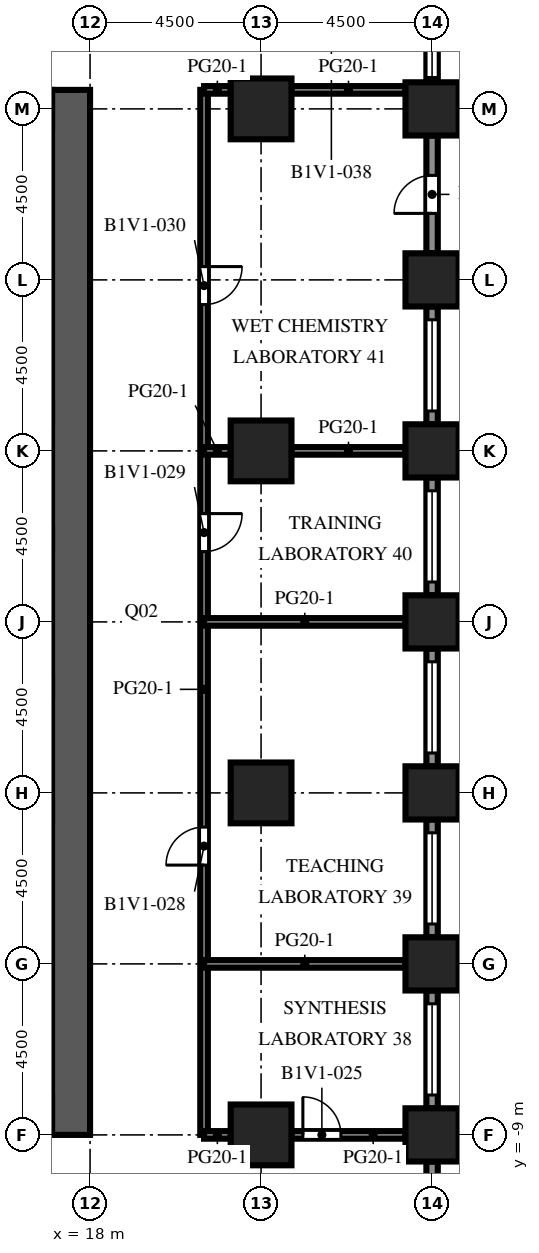
"""IFC4 building model, lengths in metres.
Left out: names, types, materials, properties, quantities, classifications, styles, units other than length and angle.
Written with IfcOpenShell. Run it as: python <this file> out.ifc"""

import sys

from ifc_helpers import new_model, si_unit, direction, frame, frame_2d, origin, origin_2d, place, context, subcontext, project, spatial, rectangle, extrude, element, fill, save


model = new_model("IFC4")
c1 = context("Model", 3, precision=1e-05, world=origin(), true_north=direction((0.0, 1.0)))
c2 = subcontext(c1, "Body", "Model", "MODEL_VIEW")
j1 = project(units=[si_unit("LENGTHUNIT", "METRE"), si_unit("PLANEANGLEUNIT", "RADIAN")], contexts=[c1])
p1 = place(None, origin())
s1 = spatial("IfcSite", under=j1, at=p1, CompositionType="ELEMENT")
p2 = place(p1, origin())
s2 = spatial("IfcBuilding", under=s1, at=p2, CompositionType="ELEMENT")
p3 = place(p2, frame((0.0, 0.0, 23.6)))
s3 = spatial("IfcBuildingStorey", under=s2, at=p3, CompositionType="ELEMENT", Elevation=23.6)
for number, where, z_axis, x_axis in (
    (1, (27.0, -9.0, 0.0), (0.0, 0.0, 1.0), (1.0, 0.0, 0.0)),
    (2, (27.0, -4.5, 0.0), (0.0, 0.0, 1.0), (1.0, 0.0, 0.0)),
    (3, (27.0, 0.0, 0.0), (0.0, 0.0, 1.0), (1.0, 0.0, 0.0)),
    (4, (27.0, 4.5, 0.0), (0.0, 0.0, 1.0), (1.0, 0.0, 0.0)),
    (5, (27.0, 9.0, 0.0), (0.0, 0.0, 1.0), (1.0, 0.0, 0.0)),
    (6, (27.0, 13.5, 0.0), (0.0, 0.0, 1.0), (1.0, 0.0, 0.0)),
    (7, (27.0, 18.0, 0.0), (0.0, 0.0, 1.0), (1.0, 0.0, 0.0)),
):
    element("IfcColumn", number, at=place(p3, frame(where, z_axis=z_axis, x_axis=x_axis)), inside=s3, PredefinedType="COLUMN", context=c2, shape_type="SweptSolid", body=[
        extrude(rectangle(XDim=1.4, YDim=1.4, at=origin_2d()), origin(), (0.0, 0.0, 1.0), 4.1),
    ])
for number, where, z_axis, x_axis in (
    (8, (22.5, -9.0, 0.0), (0.0, 0.0, 1.0), (1.0, 0.0, 0.0)),
    (9, (22.5, 0.0, 0.0), (0.0, 0.0, 1.0), (1.0, 0.0, 0.0)),
    (10, (22.5, 9.0, 0.0), (0.0, 0.0, 1.0), (1.0, 0.0, 0.0)),
    (11, (22.5, 18.0, 0.0), (0.0, 0.0, 1.0), (1.0, 0.0, 0.0)),
):
    element("IfcColumn", number, at=place(p3, frame(where, z_axis=z_axis, x_axis=x_axis)), inside=s3, PredefinedType="COLUMN", context=c2, shape_type="SweptSolid", body=[
        extrude(rectangle(XDim=1.6, YDim=1.6, at=origin_2d()), origin(), (0.0, 0.0, 1.0), 4.1),
    ])
p4 = place(p3, frame((17.5, -9.0, 0.0), z_axis=(0.0, 0.0, 1.0), x_axis=(0.0, 1.0, 0.0)))
e12 = element("IfcWall", 12, at=p4, inside=s3, PredefinedType="SHEAR", context=c2, shape_type="SweptSolid", body=[
    extrude(rectangle(XDim=27.5, YDim=1.0, at=frame_2d((13.75, 0.0))), origin(), (0.0, 0.0, 1.0), 4.1),
])
p5 = place(p4, frame((12.55, 0.0, 0.0)))
e13 = element("IfcOpeningElement", 13, at=p5, cuts=e12, PredefinedType="OPENING", context=c2, shape_type="SweptSolid", body=[
    extrude(rectangle(XDim=2.4, YDim=2.4, at=frame_2d((1.2, 1.2))), frame((0.0, 0.51, 0.0), z_axis=(0.0, -1.0, 0.0), x_axis=(1.0, 0.0, 0.0)), (0.0, 0.0, 1.0), 1.02),
])
p6 = place(p4, frame((6.825, 0.0, 0.0)))
e14 = element("IfcOpeningElement", 14, at=p6, cuts=e12, PredefinedType="OPENING", context=c2, shape_type="SweptSolid", body=[
    extrude(rectangle(XDim=1.2, YDim=2.1, at=frame_2d((0.6, 1.05))), frame((0.0, 0.51, 0.0), z_axis=(0.0, -1.0, 0.0), x_axis=(1.0, 0.0, 0.0)), (0.0, 0.0, 1.0), 1.02),
])
p7 = place(p4, frame((19.475, 0.0, 0.0)))
e15 = element("IfcOpeningElement", 15, at=p7, cuts=e12, PredefinedType="OPENING", context=c2, shape_type="SweptSolid", body=[
    extrude(rectangle(XDim=1.2, YDim=2.1, at=frame_2d((0.6, 1.05))), frame((0.0, 0.51, 0.0), z_axis=(0.0, -1.0, 0.0), x_axis=(1.0, 0.0, 0.0)), (0.0, 0.0, 1.0), 1.02),
])
p8 = place(p3, frame((27.0, -9.7, 0.0), z_axis=(0.0, 0.0, 1.0), x_axis=(0.0, -1.0, 0.0)))
e16 = element("IfcWall", 16, at=p8, inside=s3, PredefinedType="SOLIDWALL", context=c2, shape_type="SweptSolid", body=[
    extrude(rectangle(XDim=3.1, YDim=0.3, at=frame_2d((1.55, 0.0))), origin(), (0.0, 0.0, 1.0), 2.75),
])
p9 = place(p8, frame((0.475, 0.0, 0.8)))
e17 = element("IfcOpeningElement", 17, at=p9, cuts=e16, PredefinedType="OPENING", context=c2, shape_type="SweptSolid", body=[
    extrude(rectangle(XDim=1.2, YDim=1.7, at=frame_2d((0.6, 0.85))), frame((0.0, 0.16, 0.0), z_axis=(0.0, -1.0, 0.0), x_axis=(1.0, 0.0, 0.0)), (0.0, 0.0, 1.0), 0.32),
])
p10 = place(p3, frame((27.0, -5.2, 0.0), z_axis=(0.0, 0.0, 1.0), x_axis=(0.0, -1.0, 0.0)))
e18 = element("IfcWall", 18, at=p10, inside=s3, PredefinedType="SOLIDWALL", context=c2, shape_type="SweptSolid", body=[
    extrude(rectangle(XDim=3.1, YDim=0.3, at=frame_2d((1.55, 0.0))), origin(), (0.0, 0.0, 1.0), 2.75),
])
p11 = place(p10, frame((0.35, 0.0, 0.8)))
e19 = element("IfcOpeningElement", 19, at=p11, cuts=e18, PredefinedType="OPENING", context=c2, shape_type="SweptSolid", body=[
    extrude(rectangle(XDim=2.4, YDim=1.7, at=frame_2d((1.2, 0.85))), frame((0.0, 0.16, 0.0), z_axis=(0.0, -1.0, 0.0), x_axis=(1.0, 0.0, 0.0)), (0.0, 0.0, 1.0), 0.32),
])
p12 = place(p3, frame((27.0, -0.7, 0.0), z_axis=(0.0, 0.0, 1.0), x_axis=(0.0, -1.0, 0.0)))
e20 = element("IfcWall", 20, at=p12, inside=s3, PredefinedType="SOLIDWALL", context=c2, shape_type="SweptSolid", body=[
    extrude(rectangle(XDim=3.1, YDim=0.3, at=frame_2d((1.55, 0.0))), origin(), (0.0, 0.0, 1.0), 2.75),
])
p13 = place(p12, frame((0.35, 0.0, 0.8)))
e21 = element("IfcOpeningElement", 21, at=p13, cuts=e20, PredefinedType="OPENING", context=c2, shape_type="SweptSolid", body=[
    extrude(rectangle(XDim=2.4, YDim=1.7, at=frame_2d((1.2, 0.85))), frame((0.0, 0.16, 0.0), z_axis=(0.0, -1.0, 0.0), x_axis=(1.0, 0.0, 0.0)), (0.0, 0.0, 1.0), 0.32),
])
p14 = place(p3, frame((27.0, 3.8, 0.0), z_axis=(0.0, 0.0, 1.0), x_axis=(0.0, -1.0, 0.0)))
e22 = element("IfcWall", 22, at=p14, inside=s3, PredefinedType="SOLIDWALL", context=c2, shape_type="SweptSolid", body=[
    extrude(rectangle(XDim=3.1, YDim=0.3, at=frame_2d((1.55, 0.0))), origin(), (0.0, 0.0, 1.0), 2.75),
])
p15 = place(p14, frame((0.35, 0.0, 0.8)))
e23 = element("IfcOpeningElement", 23, at=p15, cuts=e22, PredefinedType="OPENING", context=c2, shape_type="SweptSolid", body=[
    extrude(rectangle(XDim=2.4, YDim=1.7, at=frame_2d((1.2, 0.85))), frame((0.0, 0.16, 0.0), z_axis=(0.0, -1.0, 0.0), x_axis=(1.0, 0.0, 0.0)), (0.0, 0.0, 1.0), 0.32),
])
p16 = place(p3, frame((27.0, 8.3, 0.0), z_axis=(0.0, 0.0, 1.0), x_axis=(0.0, -1.0, 0.0)))
e24 = element("IfcWall", 24, at=p16, inside=s3, PredefinedType="SOLIDWALL", context=c2, shape_type="SweptSolid", body=[
    extrude(rectangle(XDim=3.1, YDim=0.3, at=frame_2d((1.55, 0.0))), origin(), (0.0, 0.0, 1.0), 2.75),
])
p17 = place(p16, frame((0.35, 0.0, 0.8)))
e25 = element("IfcOpeningElement", 25, at=p17, cuts=e24, PredefinedType="OPENING", context=c2, shape_type="SweptSolid", body=[
    extrude(rectangle(XDim=2.4, YDim=1.7, at=frame_2d((1.2, 0.85))), frame((0.0, 0.16, 0.0), z_axis=(0.0, -1.0, 0.0), x_axis=(1.0, 0.0, 0.0)), (0.0, 0.0, 1.0), 0.32),
])
p18 = place(p3, frame((27.0, 12.8, 0.0), z_axis=(0.0, 0.0, 1.0), x_axis=(0.0, -1.0, 0.0)))
e26 = element("IfcWall", 26, at=p18, inside=s3, PredefinedType="SOLIDWALL", context=c2, shape_type="SweptSolid", body=[
    extrude(rectangle(XDim=3.1, YDim=0.3, at=frame_2d((1.55, 0.0))), origin(), (0.0, 0.0, 1.0), 2.75),
])
p19 = place(p18, frame((0.35, 0.0, 0.8)))
e27 = element("IfcOpeningElement", 27, at=p19, cuts=e26, PredefinedType="OPENING", context=c2, shape_type="SweptSolid", body=[
    extrude(rectangle(XDim=2.4, YDim=1.7, at=frame_2d((1.2, 0.85))), frame((0.0, 0.16, 0.0), z_axis=(0.0, -1.0, 0.0), x_axis=(1.0, 0.0, 0.0)), (0.0, 0.0, 1.0), 0.32),
])
p20 = place(p3, frame((27.0, 17.3, 0.0), z_axis=(0.0, 0.0, 1.0), x_axis=(0.0, -1.0, 0.0)))
e28 = element("IfcWall", 28, at=p20, inside=s3, PredefinedType="SOLIDWALL", context=c2, shape_type="SweptSolid", body=[
    extrude(rectangle(XDim=3.1, YDim=0.3, at=frame_2d((1.55, 0.0))), origin(), (0.0, 0.0, 1.0), 2.75),
])
p21 = place(p20, frame((1.05, 0.0, 0.0)))
e29 = element("IfcOpeningElement", 29, at=p21, cuts=e28, PredefinedType="OPENING", context=c2, shape_type="SweptSolid", body=[
    extrude(rectangle(XDim=1.0, YDim=2.2, at=frame_2d((0.5, 1.1))), frame((0.0, 0.16, 0.0), z_axis=(0.0, -1.0, 0.0), x_axis=(1.0, 0.0, 0.0)), (0.0, 0.0, 1.0), 0.32),
])
p22 = place(p3, frame((27.0, 21.8, 0.0), z_axis=(0.0, 0.0, 1.0), x_axis=(0.0, -1.0, 0.0)))
e30 = element("IfcWall", 30, at=p22, inside=s3, PredefinedType="SOLIDWALL", context=c2, shape_type="SweptSolid", body=[
    extrude(rectangle(XDim=3.1, YDim=0.3, at=frame_2d((1.55, 0.0))), origin(), (0.0, 0.0, 1.0), 2.75),
])
p23 = place(p22, frame((0.575, 0.0, 0.8)))
e31 = element("IfcOpeningElement", 31, at=p23, cuts=e30, PredefinedType="OPENING", context=c2, shape_type="SweptSolid", body=[
    extrude(rectangle(XDim=2.4, YDim=1.7, at=frame_2d((1.2, 0.85))), frame((0.0, 0.16, 0.0), z_axis=(0.0, -1.0, 0.0), x_axis=(1.0, 0.0, 0.0)), (0.0, 0.0, 1.0), 0.32),
])
p24 = place(p3, frame((21.0, 18.5, 0.0), z_axis=(0.0, 0.0, 1.0), x_axis=(0.0, -1.0, 0.0)))
e32 = element("IfcWall", 32, at=p24, inside=s3, PredefinedType="PARTITIONING", context=c2, shape_type="SweptSolid", body=[
    extrude(rectangle(XDim=27.5, YDim=0.2, at=frame_2d((13.75, 0.0))), origin(), (0.0, 0.0, 1.0), 3.65),
])
p25 = place(p24, frame((19.4, 0.0, 0.0)))
e33 = element("IfcOpeningElement", 33, at=p25, cuts=e32, PredefinedType="OPENING", context=c2, shape_type="SweptSolid", body=[
    extrude(rectangle(XDim=1.0, YDim=2.1, at=frame_2d((0.5, 1.05))), frame((0.0, 0.11, 0.0), z_axis=(0.0, -1.0, 0.0), x_axis=(1.0, 0.0, 0.0)), (0.0, 0.0, 1.0), 0.22),
])
p26 = place(p24, frame((11.15, 0.0, 0.0)))
e34 = element("IfcOpeningElement", 34, at=p26, cuts=e32, PredefinedType="OPENING", context=c2, shape_type="SweptSolid", body=[
    extrude(rectangle(XDim=1.0, YDim=2.1, at=frame_2d((0.5, 1.05))), frame((0.0, 0.11, 0.0), z_axis=(0.0, -1.0, 0.0), x_axis=(1.0, 0.0, 0.0)), (0.0, 0.0, 1.0), 0.22),
])
p27 = place(p24, frame((4.65, 0.0, 0.0)))
e35 = element("IfcOpeningElement", 35, at=p27, cuts=e32, PredefinedType="OPENING", context=c2, shape_type="SweptSolid", body=[
    extrude(rectangle(XDim=1.0, YDim=2.1, at=frame_2d((0.5, 1.05))), frame((0.0, 0.11, 0.0), z_axis=(0.0, -1.0, 0.0), x_axis=(1.0, 0.0, 0.0)), (0.0, 0.0, 1.0), 0.22),
])
p28 = place(p3, frame((21.0, -9.0, 0.0), z_axis=(0.0, 0.0, 1.0), x_axis=(1.0, 0.0, 0.0)))
e36 = element("IfcWall", 36, at=p28, inside=s3, PredefinedType="PARTITIONING", context=c2, shape_type="SweptSolid", body=[
    extrude(rectangle(XDim=0.7, YDim=0.2, at=frame_2d((0.35, 0.0))), origin(), (0.0, 0.0, 1.0), 3.65),
])
p29 = place(p3, frame((23.3, -9.0, 0.0), z_axis=(0.0, 0.0, 1.0), x_axis=(1.0, 0.0, 0.0)))
e37 = element("IfcWall", 37, at=p29, inside=s3, PredefinedType="PARTITIONING", context=c2, shape_type="SweptSolid", body=[
    extrude(rectangle(XDim=3.0, YDim=0.2, at=frame_2d((1.5, 0.0))), origin(), (0.0, 0.0, 1.0), 3.65),
])
p30 = place(p29, frame((0.3, 0.0, 0.0)))
e38 = element("IfcOpeningElement", 38, at=p30, cuts=e37, PredefinedType="OPENING", context=c2, shape_type="SweptSolid", body=[
    extrude(rectangle(XDim=1.0, YDim=2.1, at=frame_2d((0.5, 1.05))), frame((0.0, 0.11, 0.0), z_axis=(0.0, -1.0, 0.0), x_axis=(1.0, 0.0, 0.0)), (0.0, 0.0, 1.0), 0.22),
])
for number, where, z_axis, x_axis in (
    (39, (21.0, -4.5, 0.0), (0.0, 0.0, 1.0), (1.0, 0.0, 0.0)),
    (40, (21.0, 4.5, 0.0), (0.0, 0.0, 1.0), (1.0, 0.0, 0.0)),
):
    element("IfcWall", number, at=place(p3, frame(where, z_axis=z_axis, x_axis=x_axis)), inside=s3, PredefinedType="PARTITIONING", context=c2, shape_type="SweptSolid", body=[
        extrude(rectangle(XDim=5.3, YDim=0.2, at=frame_2d((2.65, 0.0))), origin(), (0.0, 0.0, 1.0), 3.65),
    ])
p31 = place(p3, frame((21.0, 9.0, 0.0), z_axis=(0.0, 0.0, 1.0), x_axis=(1.0, 0.0, 0.0)))
e41 = element("IfcWall", 41, at=p31, inside=s3, PredefinedType="PARTITIONING", context=c2, shape_type="SweptSolid", body=[
    extrude(rectangle(XDim=0.7, YDim=0.2, at=frame_2d((0.35, 0.0))), origin(), (0.0, 0.0, 1.0), 3.65),
])
p32 = place(p3, frame((23.3, 9.0, 0.0), z_axis=(0.0, 0.0, 1.0), x_axis=(1.0, 0.0, 0.0)))
e42 = element("IfcWall", 42, at=p32, inside=s3, PredefinedType="PARTITIONING", context=c2, shape_type="SweptSolid", body=[
    extrude(rectangle(XDim=3.0, YDim=0.2, at=frame_2d((1.5, 0.0))), origin(), (0.0, 0.0, 1.0), 3.65),
])
p33 = place(p3, frame((21.0, 18.5, 0.0), z_axis=(0.0, 0.0, 1.0), x_axis=(1.0, 0.0, 0.0)))
e43 = element("IfcWall", 43, at=p33, inside=s3, PredefinedType="PARTITIONING", context=c2, shape_type="SweptSolid", body=[
    extrude(rectangle(XDim=0.7, YDim=0.2, at=frame_2d((0.35, 0.0))), origin(), (0.0, 0.0, 1.0), 3.65),
])
p34 = place(p3, frame((23.3, 18.5, 0.0), z_axis=(0.0, 0.0, 1.0), x_axis=(1.0, 0.0, 0.0)))
e44 = element("IfcWall", 44, at=p34, inside=s3, PredefinedType="PARTITIONING", context=c2, shape_type="SweptSolid", body=[
    extrude(rectangle(XDim=3.0, YDim=0.2, at=frame_2d((1.5, 0.0))), origin(), (0.0, 0.0, 1.0), 3.65),
])
p35 = place(p11, origin())
e45 = element("IfcWindow", 45, at=p35, inside=s3, PartitioningType="SINGLE_PANEL", PredefinedType="WINDOW", context=c2, shape_type="SweptSolid", body=[
    extrude(rectangle(XDim=2.4, YDim=1.7, at=frame_2d((1.2, 0.85))), frame((0.0, 0.03, 0.0), z_axis=(0.0, -1.0, 0.0), x_axis=(1.0, 0.0, 0.0)), (0.0, 0.0, 1.0), 0.06),
])
fill(e19, e45)
p36 = place(p13, origin())
e46 = element("IfcWindow", 46, at=p36, inside=s3, PartitioningType="SINGLE_PANEL", PredefinedType="WINDOW", context=c2, shape_type="SweptSolid", body=[
    extrude(rectangle(XDim=2.4, YDim=1.7, at=frame_2d((1.2, 0.85))), frame((0.0, 0.03, 0.0), z_axis=(0.0, -1.0, 0.0), x_axis=(1.0, 0.0, 0.0)), (0.0, 0.0, 1.0), 0.06),
])
fill(e21, e46)
p37 = place(p15, origin())
e47 = element("IfcWindow", 47, at=p37, inside=s3, PartitioningType="SINGLE_PANEL", PredefinedType="WINDOW", context=c2, shape_type="SweptSolid", body=[
    extrude(rectangle(XDim=2.4, YDim=1.7, at=frame_2d((1.2, 0.85))), frame((0.0, 0.03, 0.0), z_axis=(0.0, -1.0, 0.0), x_axis=(1.0, 0.0, 0.0)), (0.0, 0.0, 1.0), 0.06),
])
fill(e23, e47)
p38 = place(p17, origin())
e48 = element("IfcWindow", 48, at=p38, inside=s3, PartitioningType="SINGLE_PANEL", PredefinedType="WINDOW", context=c2, shape_type="SweptSolid", body=[
    extrude(rectangle(XDim=2.4, YDim=1.7, at=frame_2d((1.2, 0.85))), frame((0.0, 0.03, 0.0), z_axis=(0.0, -1.0, 0.0), x_axis=(1.0, 0.0, 0.0)), (0.0, 0.0, 1.0), 0.06),
])
fill(e25, e48)
p39 = place(p19, origin())
e49 = element("IfcWindow", 49, at=p39, inside=s3, PartitioningType="SINGLE_PANEL", PredefinedType="WINDOW", context=c2, shape_type="SweptSolid", body=[
    extrude(rectangle(XDim=2.4, YDim=1.7, at=frame_2d((1.2, 0.85))), frame((0.0, 0.03, 0.0), z_axis=(0.0, -1.0, 0.0), x_axis=(1.0, 0.0, 0.0)), (0.0, 0.0, 1.0), 0.06),
])
fill(e27, e49)
p40 = place(p21, origin())
e50 = element("IfcDoor", 50, at=p40, inside=s3, OperationType="SINGLE_SWING_RIGHT", PredefinedType="DOOR", context=c2, shape_type="SweptSolid", body=[
    extrude(rectangle(XDim=1.0, YDim=2.2, at=frame_2d((0.5, 1.1))), frame((0.0, 0.025, 0.0), z_axis=(0.0, -1.0, 0.0), x_axis=(1.0, 0.0, 0.0)), (0.0, 0.0, 1.0), 0.05),
])
fill(e29, e50)
p41 = place(p23, origin())
e51 = element("IfcWindow", 51, at=p41, inside=s3, PartitioningType="SINGLE_PANEL", PredefinedType="WINDOW", context=c2, shape_type="SweptSolid", body=[
    extrude(rectangle(XDim=2.4, YDim=1.7, at=frame_2d((1.2, 0.85))), frame((0.0, 0.03, 0.0), z_axis=(0.0, -1.0, 0.0), x_axis=(1.0, 0.0, 0.0)), (0.0, 0.0, 1.0), 0.06),
])
fill(e31, e51)
p42 = place(p5, origin())
e52 = element("IfcDoor", 52, at=p42, inside=s3, OperationType="DOUBLE_DOOR_DOUBLE_SWING", PredefinedType="DOOR", context=c2, shape_type="SweptSolid", body=[
    extrude(rectangle(XDim=2.4, YDim=2.4, at=frame_2d((1.2, 1.2))), frame((0.0, 0.025, 0.0), z_axis=(0.0, -1.0, 0.0), x_axis=(1.0, 0.0, 0.0)), (0.0, 0.0, 1.0), 0.05),
])
fill(e13, e52)
p43 = place(p6, frame((1.2, 0.0, 0.0), z_axis=(0.0, 0.0, 1.0), x_axis=(-1.0, 0.0, 0.0)))
e53 = element("IfcDoor", 53, at=p43, inside=s3, OperationType="SINGLE_SWING_LEFT", PredefinedType="DOOR", context=c2, shape_type="SweptSolid", body=[
    extrude(rectangle(XDim=1.2, YDim=2.1, at=frame_2d((0.6, 1.05))), frame((0.0, 0.025, 0.0), z_axis=(0.0, -1.0, 0.0), x_axis=(1.0, 0.0, 0.0)), (0.0, 0.0, 1.0), 0.05),
])
fill(e14, e53)
p44 = place(p7, frame((1.2, 0.0, 0.0), z_axis=(0.0, 0.0, 1.0), x_axis=(-1.0, 0.0, 0.0)))
e54 = element("IfcDoor", 54, at=p44, inside=s3, OperationType="SINGLE_SWING_LEFT", PredefinedType="DOOR", context=c2, shape_type="SweptSolid", body=[
    extrude(rectangle(XDim=1.2, YDim=2.1, at=frame_2d((0.6, 1.05))), frame((0.0, 0.025, 0.0), z_axis=(0.0, -1.0, 0.0), x_axis=(1.0, 0.0, 0.0)), (0.0, 0.0, 1.0), 0.05),
])
fill(e15, e54)
p45 = place(p30, origin())
e55 = element("IfcDoor", 55, at=p45, inside=s3, OperationType="SINGLE_SWING_LEFT", PredefinedType="DOOR", context=c2, shape_type="SweptSolid", body=[
    extrude(rectangle(XDim=1.0, YDim=2.1, at=frame_2d((0.5, 1.05))), frame((0.0, 0.025, 0.0), z_axis=(0.0, -1.0, 0.0), x_axis=(1.0, 0.0, 0.0)), (0.0, 0.0, 1.0), 0.05),
])
fill(e38, e55)
p46 = place(p25, origin())
e56 = element("IfcDoor", 56, at=p46, inside=s3, OperationType="SINGLE_SWING_RIGHT", PredefinedType="DOOR", context=c2, shape_type="SweptSolid", body=[
    extrude(rectangle(XDim=1.0, YDim=2.1, at=frame_2d((0.5, 1.05))), frame((0.0, 0.025, 0.0), z_axis=(0.0, -1.0, 0.0), x_axis=(1.0, 0.0, 0.0)), (0.0, 0.0, 1.0), 0.05),
])
fill(e33, e56)
p47 = place(p26, origin())
e57 = element("IfcDoor", 57, at=p47, inside=s3, OperationType="SINGLE_SWING_LEFT", PredefinedType="DOOR", context=c2, shape_type="SweptSolid", body=[
    extrude(rectangle(XDim=1.0, YDim=2.1, at=frame_2d((0.5, 1.05))), frame((0.0, 0.025, 0.0), z_axis=(0.0, -1.0, 0.0), x_axis=(1.0, 0.0, 0.0)), (0.0, 0.0, 1.0), 0.05),
])
fill(e34, e57)
p48 = place(p27, origin())
e58 = element("IfcDoor", 58, at=p48, inside=s3, OperationType="SINGLE_SWING_LEFT", PredefinedType="DOOR", context=c2, shape_type="SweptSolid", body=[
    extrude(rectangle(XDim=1.0, YDim=2.1, at=frame_2d((0.5, 1.05))), frame((0.0, 0.025, 0.0), z_axis=(0.0, -1.0, 0.0), x_axis=(1.0, 0.0, 0.0)), (0.0, 0.0, 1.0), 0.05),
])
fill(e35, e58)
save(model, sys.argv[1])
